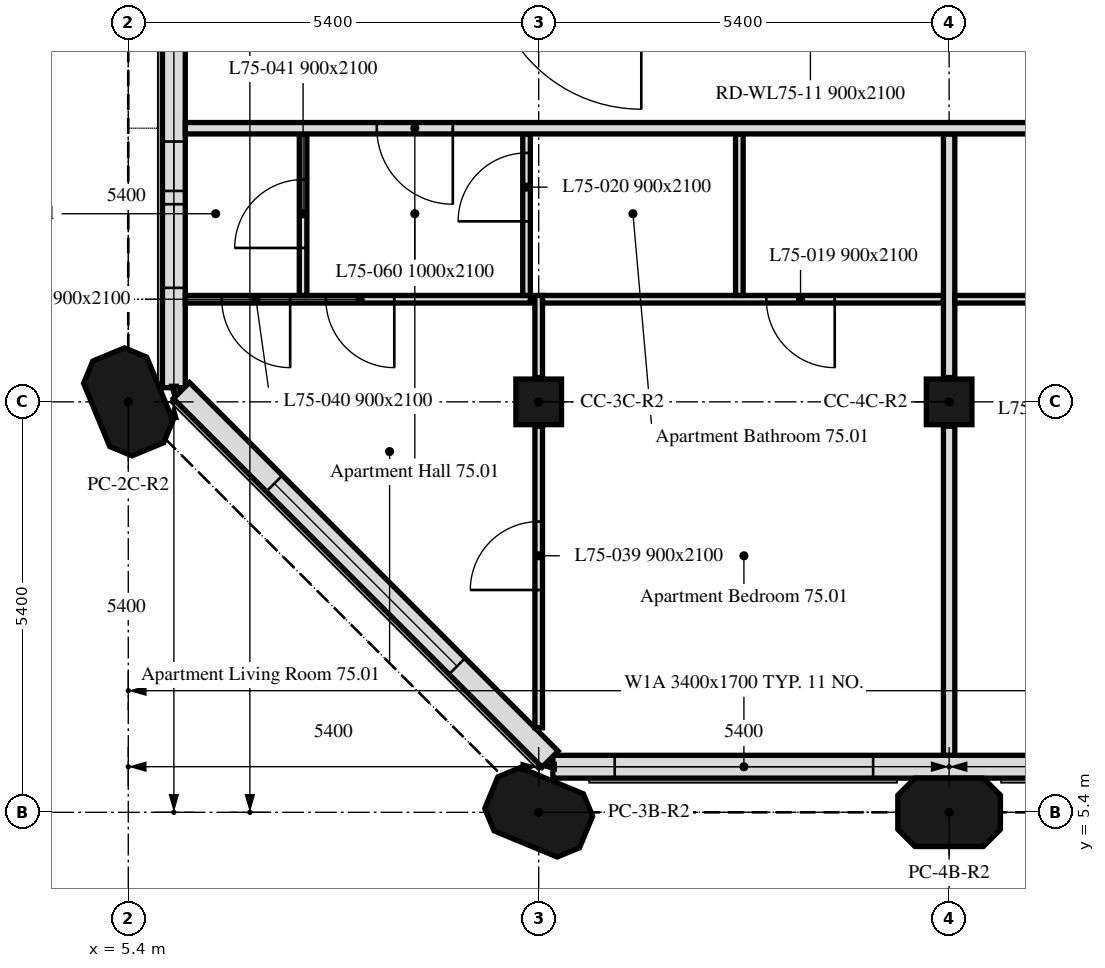
"""IFC4 building model, lengths in metres.
Left out: names, types, materials, properties, quantities, classifications, styles, units other than length and angle.
Written with IfcOpenShell. Run it as: python <this file> out.ifc"""

import sys

from ifc_helpers import new_model, si_unit, direction, frame, frame_2d, origin, origin_2d, place, context, subcontext, project, spatial, polyline, rectangle, outline, extrude, element, fill, save


model = new_model("IFC4")
c1 = context("Model", 3, precision=1e-05, world=origin(), true_north=direction((0.0, 1.0)))
c2 = subcontext(c1, "Body", "Model", "MODEL_VIEW")
j1 = project(units=[si_unit("LENGTHUNIT", "METRE"), si_unit("PLANEANGLEUNIT", "RADIAN")], contexts=[c1])
p1 = place(None, origin())
s1 = spatial("IfcSite", under=j1, at=p1, CompositionType="ELEMENT")
p2 = place(p1, origin())
s2 = spatial("IfcBuilding", under=s1, at=p2, CompositionType="ELEMENT")
p3 = place(p2, frame((0.0, 0.0, 301.6)))
s3 = spatial("IfcBuildingStorey", under=s2, at=p3, CompositionType="ELEMENT", Elevation=301.6)
for number, where, z_axis, x_axis in (
    (1, (10.8, 5.4, 0.0), (0.0, 0.0, 1.0), (-0.924, 0.383, 0.0)),
    (2, (16.2, 5.4, 0.0), (0.0, 0.0, 1.0), (1.0, 0.0, 0.0)),
    (3, (5.4, 10.8, 0.0), (0.0, 0.0, 1.0), (-0.383, 0.924, 0.0)),
):
    element("IfcColumn", number, at=place(p3, frame(where, z_axis=z_axis, x_axis=x_axis)), inside=s3, PredefinedType="COLUMN", context=c2, shape_type="SweptSolid", body=[
        extrude(outline(polyline([(-0.45, -0.45), (0.45, -0.45), (0.675, -0.225), (0.675, 0.225), (0.45, 0.45), (-0.45, 0.45), (-0.675, 0.225), (-0.675, -0.225), (-0.45, -0.45)])), origin(), (0.0, 0.0, 1.0), 3.0),
    ])
for number, where, z_axis, x_axis in (
    (4, (10.8, 10.8, 0.0), (0.0, 0.0, 1.0), (1.0, 0.0, 0.0)),
    (5, (16.2, 10.8, 0.0), (0.0, 0.0, 1.0), (1.0, 0.0, 0.0)),
):
    element("IfcColumn", number, at=place(p3, frame(where, z_axis=z_axis, x_axis=x_axis)), inside=s3, PredefinedType="COLUMN", context=c2, shape_type="SweptSolid", body=[
        extrude(rectangle(XDim=0.6, YDim=0.6, at=origin_2d()), origin(), (0.0, 0.0, 1.0), 3.0),
    ])
p4 = place(p3, frame((10.986, 6.0, 0.0), z_axis=(0.0, 0.0, 1.0), x_axis=(1.0, 0.0, 0.0)))
e6 = element("IfcWall", 6, at=p4, inside=s3, PredefinedType="SOLIDWALL", context=c2, shape_type="SweptSolid", body=[
    extrude(rectangle(XDim=32.027, YDim=0.3, at=frame_2d((16.014, 0.0))), origin(), (0.0, 0.0, 1.0), 3.0),
])
p5 = place(p4, frame((0.814, 0.0, 0.9)))
e7 = element("IfcOpeningElement", 7, at=p5, cuts=e6, PredefinedType="OPENING", context=c2, shape_type="SweptSolid", body=[
    extrude(rectangle(XDim=3.4, YDim=1.7, at=frame_2d((1.7, 0.85))), frame((0.0, 0.16, 0.0), z_axis=(0.0, -1.0, 0.0), x_axis=(1.0, 0.0, 0.0)), (0.0, 0.0, 1.0), 0.32),
])
p6 = place(p4, frame((6.564, 0.0, 0.9)))
e8 = element("IfcOpeningElement", 8, at=p6, cuts=e6, PredefinedType="OPENING", context=c2, shape_type="SweptSolid", body=[
    extrude(rectangle(XDim=1.1, YDim=1.7, at=frame_2d((0.55, 0.85))), frame((0.0, 0.16, 0.0), z_axis=(0.0, -1.0, 0.0), x_axis=(1.0, 0.0, 0.0)), (0.0, 0.0, 1.0), 0.32),
])
p7 = place(p4, frame((11.614, 0.0, 0.9)))
e9 = element("IfcOpeningElement", 9, at=p7, cuts=e6, PredefinedType="OPENING", context=c2, shape_type="SweptSolid", body=[
    extrude(rectangle(XDim=3.4, YDim=1.7, at=frame_2d((1.7, 0.85))), frame((0.0, 0.16, 0.0), z_axis=(0.0, -1.0, 0.0), x_axis=(1.0, 0.0, 0.0)), (0.0, 0.0, 1.0), 0.32),
])
p8 = place(p4, frame((17.364, 0.0, 0.9)))
e10 = element("IfcOpeningElement", 10, at=p8, cuts=e6, PredefinedType="OPENING", context=c2, shape_type="SweptSolid", body=[
    extrude(rectangle(XDim=1.1, YDim=1.7, at=frame_2d((0.55, 0.85))), frame((0.0, 0.16, 0.0), z_axis=(0.0, -1.0, 0.0), x_axis=(1.0, 0.0, 0.0)), (0.0, 0.0, 1.0), 0.32),
])
p9 = place(p4, frame((22.414, 0.0, 0.9)))
e11 = element("IfcOpeningElement", 11, at=p9, cuts=e6, PredefinedType="OPENING", context=c2, shape_type="SweptSolid", body=[
    extrude(rectangle(XDim=3.4, YDim=1.7, at=frame_2d((1.7, 0.85))), frame((0.0, 0.16, 0.0), z_axis=(0.0, -1.0, 0.0), x_axis=(1.0, 0.0, 0.0)), (0.0, 0.0, 1.0), 0.32),
])
p10 = place(p4, frame((28.164, 0.0, 0.9)))
e12 = element("IfcOpeningElement", 12, at=p10, cuts=e6, PredefinedType="OPENING", context=c2, shape_type="SweptSolid", body=[
    extrude(rectangle(XDim=1.1, YDim=1.7, at=frame_2d((0.55, 0.85))), frame((0.0, 0.16, 0.0), z_axis=(0.0, -1.0, 0.0), x_axis=(1.0, 0.0, 0.0)), (0.0, 0.0, 1.0), 0.32),
])
p11 = place(p3, frame((6.0, 16.2, 0.0), z_axis=(0.0, 0.0, 1.0), x_axis=(0.0, -1.0, 0.0)))
e13 = element("IfcWall", 13, at=p11, inside=s3, PredefinedType="SOLIDWALL", context=c2, shape_type="SweptSolid", body=[
    extrude(rectangle(XDim=5.214, YDim=0.3, at=frame_2d((2.607, 0.0))), origin(), (0.0, 0.0, 1.0), 3.0),
])
p12 = place(p11, frame((1.975, 0.0, 0.9)))
e14 = element("IfcOpeningElement", 14, at=p12, cuts=e13, PredefinedType="OPENING", context=c2, shape_type="SweptSolid", body=[
    extrude(rectangle(XDim=0.65, YDim=1.7, at=frame_2d((0.325, 0.85))), frame((0.0, 0.16, 0.0), z_axis=(0.0, -1.0, 0.0), x_axis=(1.0, 0.0, 0.0)), (0.0, 0.0, 1.0), 0.32),
])
p13 = place(p11, frame((2.8, 0.0, 0.9)))
e15 = element("IfcOpeningElement", 15, at=p13, cuts=e13, PredefinedType="OPENING", context=c2, shape_type="SweptSolid", body=[
    extrude(rectangle(XDim=1.1, YDim=1.7, at=frame_2d((0.55, 0.85))), frame((0.0, 0.16, 0.0), z_axis=(0.0, -1.0, 0.0), x_axis=(1.0, 0.0, 0.0)), (0.0, 0.0, 1.0), 0.32),
])
p14 = place(p3, frame((6.099, 10.949, 0.0), z_axis=(0.0, 0.0, 1.0), x_axis=(0.707106781187, -0.707106781187, 0.0)))
e16 = element("IfcWall", 16, at=p14, inside=s3, PredefinedType="SOLIDWALL", context=c2, shape_type="SweptSolid", body=[
    extrude(rectangle(XDim=6.86, YDim=0.3, at=frame_2d((3.43, 0.0))), origin(), (0.0, 0.0, 1.0), 3.0),
])
p15 = place(p14, frame((1.73, 0.0, 0.9)))
e17 = element("IfcOpeningElement", 17, at=p15, cuts=e16, PredefinedType="OPENING", context=c2, shape_type="SweptSolid", body=[
    extrude(rectangle(XDim=3.4, YDim=1.7, at=frame_2d((1.7, 0.85))), frame((0.0, 0.16, 0.0), z_axis=(0.0, -1.0, 0.0), x_axis=(1.0, 0.0, 0.0)), (0.0, 0.0, 1.0), 0.32),
])
p16 = place(p3, frame((10.8, 6.512, 0.0), z_axis=(0.0, 0.0, 1.0), x_axis=(0.0, 1.0, 0.0)))
e18 = element("IfcWall", 18, at=p16, inside=s3, PredefinedType="PARTITIONING", context=c2, shape_type="SweptSolid", body=[
    extrude(rectangle(XDim=3.968, YDim=0.1, at=frame_2d((1.984, 0.0))), origin(), (0.0, 0.0, 1.0), 3.0),
])
p17 = place(p16, frame((1.813, 0.0, 0.0)))
e19 = element("IfcOpeningElement", 19, at=p17, cuts=e18, PredefinedType="OPENING", context=c2, shape_type="SweptSolid", body=[
    extrude(rectangle(XDim=0.9, YDim=2.1, at=frame_2d((0.45, 1.05))), frame((0.0, 0.05, 0.0), z_axis=(0.0, -1.0, 0.0), x_axis=(1.0, 0.0, 0.0)), (0.0, 0.0, 1.0), 0.1),
])
p18 = place(p3, frame((10.8, 11.12, 0.0), z_axis=(0.0, 0.0, 1.0), x_axis=(0.0, 1.0, 0.0)))
e20 = element("IfcWall", 20, at=p18, inside=s3, PredefinedType="PARTITIONING", context=c2, shape_type="SweptSolid", body=[
    extrude(rectangle(XDim=1.08, YDim=0.1, at=frame_2d((0.54, 0.0))), origin(), (0.0, 0.0, 1.0), 3.0),
])
p19 = place(p3, frame((10.69, 12.15, 0.0), z_axis=(0.0, 0.0, 1.0), x_axis=(-1.0, 0.0, 0.0)))
e21 = element("IfcWall", 21, at=p19, inside=s3, PredefinedType="PARTITIONING", context=c2, shape_type="SweptSolid", body=[
    extrude(rectangle(XDim=4.539, YDim=0.1, at=frame_2d((2.27, 0.0))), origin(), (0.0, 0.0, 1.0), 3.0),
])
p20 = place(p19, frame((3.16, 0.0, 0.0)))
e22 = element("IfcOpeningElement", 22, at=p20, cuts=e21, PredefinedType="OPENING", context=c2, shape_type="SweptSolid", body=[
    extrude(rectangle(XDim=0.9, YDim=2.1, at=frame_2d((0.45, 1.05))), frame((0.0, 0.05, 0.0), z_axis=(0.0, -1.0, 0.0), x_axis=(1.0, 0.0, 0.0)), (0.0, 0.0, 1.0), 0.1),
])
p21 = place(p19, frame((1.79, 0.0, 0.0)))
e23 = element("IfcOpeningElement", 23, at=p21, cuts=e21, PredefinedType="OPENING", context=c2, shape_type="SweptSolid", body=[
    extrude(rectangle(XDim=0.9, YDim=2.1, at=frame_2d((0.45, 1.05))), frame((0.0, 0.05, 0.0), z_axis=(0.0, -1.0, 0.0), x_axis=(1.0, 0.0, 0.0)), (0.0, 0.0, 1.0), 0.1),
])
p22 = place(p3, frame((16.2, 6.151, 0.0), z_axis=(0.0, 0.0, 1.0), x_axis=(0.0, 1.0, 0.0)))
e24 = element("IfcWall", 24, at=p22, inside=s3, PredefinedType="PARTITIONING", context=c2, shape_type="SweptSolid", body=[
    extrude(rectangle(XDim=4.329, YDim=0.15, at=frame_2d((2.165, 0.0))), origin(), (0.0, 0.0, 1.0), 3.0),
])
p23 = place(p3, frame((16.125, 12.15, 0.0), z_axis=(0.0, 0.0, 1.0), x_axis=(-1.0, 0.0, 0.0)))
e25 = element("IfcWall", 25, at=p23, inside=s3, PredefinedType="PARTITIONING", context=c2, shape_type="SweptSolid", body=[
    extrude(rectangle(XDim=5.275, YDim=0.1, at=frame_2d((2.637, 0.0))), origin(), (0.0, 0.0, 1.0), 3.0),
])
p24 = place(p23, frame((1.43, 0.0, 0.0)))
e26 = element("IfcOpeningElement", 26, at=p24, cuts=e25, PredefinedType="OPENING", context=c2, shape_type="SweptSolid", body=[
    extrude(rectangle(XDim=0.9, YDim=2.1, at=frame_2d((0.45, 1.05))), frame((0.0, 0.05, 0.0), z_axis=(0.0, -1.0, 0.0), x_axis=(1.0, 0.0, 0.0)), (0.0, 0.0, 1.0), 0.1),
])
p25 = place(p3, frame((7.7, 12.2, 0.0), z_axis=(0.0, 0.0, 1.0), x_axis=(0.0, 1.0, 0.0)))
e27 = element("IfcWall", 27, at=p25, inside=s3, PredefinedType="PARTITIONING", context=c2, shape_type="SweptSolid", body=[
    extrude(rectangle(XDim=2.125, YDim=0.1, at=frame_2d((1.062, 0.0))), origin(), (0.0, 0.0, 1.0), 3.0),
])
p26 = place(p25, frame((0.625, 0.0, 0.0)))
e28 = element("IfcOpeningElement", 28, at=p26, cuts=e27, PredefinedType="OPENING", context=c2, shape_type="SweptSolid", body=[
    extrude(rectangle(XDim=0.9, YDim=2.1, at=frame_2d((0.45, 1.05))), frame((0.0, 0.05, 0.0), z_axis=(0.0, -1.0, 0.0), x_axis=(1.0, 0.0, 0.0)), (0.0, 0.0, 1.0), 0.1),
])
p27 = place(p3, frame((10.64, 12.2, 0.0), z_axis=(0.0, 0.0, 1.0), x_axis=(0.0, 1.0, 0.0)))
e29 = element("IfcWall", 29, at=p27, inside=s3, PredefinedType="PARTITIONING", context=c2, shape_type="SweptSolid", body=[
    extrude(rectangle(XDim=2.125, YDim=0.1, at=frame_2d((1.062, 0.0))), origin(), (0.0, 0.0, 1.0), 3.0),
])
p28 = place(p27, frame((0.975, 0.0, 0.0)))
e30 = element("IfcOpeningElement", 30, at=p28, cuts=e29, PredefinedType="OPENING", context=c2, shape_type="SweptSolid", body=[
    extrude(rectangle(XDim=0.9, YDim=2.1, at=frame_2d((0.45, 1.05))), frame((0.0, 0.05, 0.0), z_axis=(0.0, -1.0, 0.0), x_axis=(1.0, 0.0, 0.0)), (0.0, 0.0, 1.0), 0.1),
])
p29 = place(p3, frame((13.44, 12.2, 0.0), z_axis=(0.0, 0.0, 1.0), x_axis=(0.0, 1.0, 0.0)))
e31 = element("IfcWall", 31, at=p29, inside=s3, PredefinedType="PARTITIONING", context=c2, shape_type="SweptSolid", body=[
    extrude(rectangle(XDim=2.125, YDim=0.1, at=frame_2d((1.062, 0.0))), origin(), (0.0, 0.0, 1.0), 3.0),
])
p30 = place(p3, frame((16.2, 11.12, 0.0), z_axis=(0.0, 0.0, 1.0), x_axis=(0.0, 1.0, 0.0)))
e32 = element("IfcWall", 32, at=p30, inside=s3, PredefinedType="PARTITIONING", context=c2, shape_type="SweptSolid", body=[
    extrude(rectangle(XDim=3.205, YDim=0.15, at=frame_2d((1.603, 0.0))), origin(), (0.0, 0.0, 1.0), 3.0),
])
p31 = place(p3, frame((21.372, 12.15, 0.0), z_axis=(0.0, 0.0, 1.0), x_axis=(-1.0, 0.0, 0.0)))
e33 = element("IfcWall", 33, at=p31, inside=s3, PredefinedType="PARTITIONING", context=c2, shape_type="SweptSolid", body=[
    extrude(rectangle(XDim=5.097, YDim=0.1, at=frame_2d((2.549, 0.0))), origin(), (0.0, 0.0, 1.0), 3.0),
])
p32 = place(p31, frame((3.1, 0.0, 0.0)))
e34 = element("IfcOpeningElement", 34, at=p32, cuts=e33, PredefinedType="OPENING", context=c2, shape_type="SweptSolid", body=[
    extrude(rectangle(XDim=0.9, YDim=2.1, at=frame_2d((0.45, 1.05))), frame((0.0, 0.05, 0.0), z_axis=(0.0, -1.0, 0.0), x_axis=(1.0, 0.0, 0.0)), (0.0, 0.0, 1.0), 0.1),
])
p33 = place(p31, frame((1.6, 0.0, 0.0)))
e35 = element("IfcOpeningElement", 35, at=p33, cuts=e33, PredefinedType="OPENING", context=c2, shape_type="SweptSolid", body=[
    extrude(rectangle(XDim=0.9, YDim=2.1, at=frame_2d((0.45, 1.05))), frame((0.0, 0.05, 0.0), z_axis=(0.0, -1.0, 0.0), x_axis=(1.0, 0.0, 0.0)), (0.0, 0.0, 1.0), 0.1),
])
p34 = place(p3, frame((47.849, 14.4, 0.0), z_axis=(0.0, 0.0, 1.0), x_axis=(-1.0, 0.0, 0.0)))
e36 = element("IfcWall", 36, at=p34, inside=s3, PredefinedType="PARTITIONING", context=c2, shape_type="SweptSolid", body=[
    extrude(rectangle(XDim=41.698, YDim=0.15, at=frame_2d((20.849, 0.0))), origin(), (0.0, 0.0, 1.0), 3.0),
])
p35 = place(p34, frame((38.179, 0.0, 0.0)))
e37 = element("IfcOpeningElement", 37, at=p35, cuts=e36, PredefinedType="OPENING", context=c2, shape_type="SweptSolid", body=[
    extrude(rectangle(XDim=1.0, YDim=2.1, at=frame_2d((0.5, 1.05))), frame((0.0, 0.075, 0.0), z_axis=(0.0, -1.0, 0.0), x_axis=(1.0, 0.0, 0.0)), (0.0, 0.0, 1.0), 0.15),
])
p36 = place(p34, frame((27.977, 0.0, 0.0)))
e38 = element("IfcOpeningElement", 38, at=p36, cuts=e36, PredefinedType="OPENING", context=c2, shape_type="SweptSolid", body=[
    extrude(rectangle(XDim=1.0, YDim=2.1, at=frame_2d((0.5, 1.05))), frame((0.0, 0.075, 0.0), z_axis=(0.0, -1.0, 0.0), x_axis=(1.0, 0.0, 0.0)), (0.0, 0.0, 1.0), 0.15),
])
p37 = place(p34, frame((16.399, 0.0, 0.0)))
e39 = element("IfcOpeningElement", 39, at=p37, cuts=e36, PredefinedType="OPENING", context=c2, shape_type="SweptSolid", body=[
    extrude(rectangle(XDim=1.0, YDim=2.1, at=frame_2d((0.5, 1.05))), frame((0.0, 0.075, 0.0), z_axis=(0.0, -1.0, 0.0), x_axis=(1.0, 0.0, 0.0)), (0.0, 0.0, 1.0), 0.15),
])
p38 = place(p34, frame((5.476, 0.0, 0.0)))
e40 = element("IfcOpeningElement", 40, at=p38, cuts=e36, PredefinedType="OPENING", context=c2, shape_type="SweptSolid", body=[
    extrude(rectangle(XDim=1.0, YDim=2.1, at=frame_2d((0.5, 1.05))), frame((0.0, 0.075, 0.0), z_axis=(0.0, -1.0, 0.0), x_axis=(1.0, 0.0, 0.0)), (0.0, 0.0, 1.0), 0.15),
])
p39 = place(p5, origin())
e41 = element("IfcWindow", 41, at=p39, inside=s3, PartitioningType="SINGLE_PANEL", PredefinedType="WINDOW", context=c2, shape_type="SweptSolid", body=[
    extrude(rectangle(XDim=3.4, YDim=1.7, at=frame_2d((1.7, 0.85))), frame((0.0, 0.03, 0.0), z_axis=(0.0, -1.0, 0.0), x_axis=(1.0, 0.0, 0.0)), (0.0, 0.0, 1.0), 0.06),
])
fill(e7, e41)
p40 = place(p12, origin())
e42 = element("IfcWindow", 42, at=p40, inside=s3, PartitioningType="SINGLE_PANEL", PredefinedType="WINDOW", context=c2, shape_type="SweptSolid", body=[
    extrude(rectangle(XDim=0.65, YDim=1.7, at=frame_2d((0.325, 0.85))), frame((0.0, 0.03, 0.0), z_axis=(0.0, -1.0, 0.0), x_axis=(1.0, 0.0, 0.0)), (0.0, 0.0, 1.0), 0.06),
])
fill(e14, e42)
p41 = place(p13, origin())
e43 = element("IfcWindow", 43, at=p41, inside=s3, PartitioningType="SINGLE_PANEL", PredefinedType="WINDOW", context=c2, shape_type="SweptSolid", body=[
    extrude(rectangle(XDim=1.1, YDim=1.7, at=frame_2d((0.55, 0.85))), frame((0.0, 0.03, 0.0), z_axis=(0.0, -1.0, 0.0), x_axis=(1.0, 0.0, 0.0)), (0.0, 0.0, 1.0), 0.06),
])
fill(e15, e43)
p42 = place(p15, origin())
e44 = element("IfcWindow", 44, at=p42, inside=s3, PartitioningType="SINGLE_PANEL", PredefinedType="WINDOW", context=c2, shape_type="SweptSolid", body=[
    extrude(rectangle(XDim=3.4, YDim=1.7, at=frame_2d((1.7, 0.85))), frame((0.0, 0.03, 0.0), z_axis=(0.0, -1.0, 0.0), x_axis=(1.0, 0.0, 0.0)), (0.0, 0.0, 1.0), 0.06),
])
fill(e17, e44)
p43 = place(p24, origin())
e45 = element("IfcDoor", 45, at=p43, inside=s3, OperationType="SINGLE_SWING_RIGHT", PredefinedType="DOOR", context=c2, shape_type="SweptSolid", body=[
    extrude(rectangle(XDim=0.9, YDim=2.1, at=frame_2d((0.45, 1.05))), frame((0.0, 0.025, 0.0), z_axis=(0.0, -1.0, 0.0), x_axis=(1.0, 0.0, 0.0)), (0.0, 0.0, 1.0), 0.05),
])
fill(e26, e45)
p44 = place(p28, origin())
e46 = element("IfcDoor", 46, at=p44, inside=s3, OperationType="SINGLE_SWING_RIGHT", PredefinedType="DOOR", context=c2, shape_type="SweptSolid", body=[
    extrude(rectangle(XDim=0.9, YDim=2.1, at=frame_2d((0.45, 1.05))), frame((0.0, 0.025, 0.0), z_axis=(0.0, -1.0, 0.0), x_axis=(1.0, 0.0, 0.0)), (0.0, 0.0, 1.0), 0.05),
])
fill(e30, e46)
p45 = place(p17, origin())
e47 = element("IfcDoor", 47, at=p45, inside=s3, OperationType="SINGLE_SWING_LEFT", PredefinedType="DOOR", context=c2, shape_type="SweptSolid", body=[
    extrude(rectangle(XDim=0.9, YDim=2.1, at=frame_2d((0.45, 1.05))), frame((0.0, 0.025, 0.0), z_axis=(0.0, -1.0, 0.0), x_axis=(1.0, 0.0, 0.0)), (0.0, 0.0, 1.0), 0.05),
])
fill(e19, e47)
p46 = place(p20, origin())
e48 = element("IfcDoor", 48, at=p46, inside=s3, OperationType="SINGLE_SWING_LEFT", PredefinedType="DOOR", context=c2, shape_type="SweptSolid", body=[
    extrude(rectangle(XDim=0.9, YDim=2.1, at=frame_2d((0.45, 1.05))), frame((0.0, 0.025, 0.0), z_axis=(0.0, -1.0, 0.0), x_axis=(1.0, 0.0, 0.0)), (0.0, 0.0, 1.0), 0.05),
])
fill(e22, e48)
p47 = place(p26, origin())
e49 = element("IfcDoor", 49, at=p47, inside=s3, OperationType="SINGLE_SWING_RIGHT", PredefinedType="DOOR", context=c2, shape_type="SweptSolid", body=[
    extrude(rectangle(XDim=0.9, YDim=2.1, at=frame_2d((0.45, 1.05))), frame((0.0, 0.025, 0.0), z_axis=(0.0, -1.0, 0.0), x_axis=(1.0, 0.0, 0.0)), (0.0, 0.0, 1.0), 0.05),
])
fill(e28, e49)
p48 = place(p21, origin())
e50 = element("IfcDoor", 50, at=p48, inside=s3, OperationType="SINGLE_SWING_RIGHT", PredefinedType="DOOR", context=c2, shape_type="SweptSolid", body=[
    extrude(rectangle(XDim=0.9, YDim=2.1, at=frame_2d((0.45, 1.05))), frame((0.0, 0.025, 0.0), z_axis=(0.0, -1.0, 0.0), x_axis=(1.0, 0.0, 0.0)), (0.0, 0.0, 1.0), 0.05),
])
fill(e23, e50)
p49 = place(p35, origin())
e51 = element("IfcDoor", 51, at=p49, inside=s3, OperationType="SINGLE_SWING_RIGHT", PredefinedType="DOOR", context=c2, shape_type="SweptSolid", body=[
    extrude(rectangle(XDim=1.0, YDim=2.1, at=frame_2d((0.5, 1.05))), frame((0.0, 0.025, 0.0), z_axis=(0.0, -1.0, 0.0), x_axis=(1.0, 0.0, 0.0)), (0.0, 0.0, 1.0), 0.05),
])
fill(e37, e51)
save(model, sys.argv[1])
